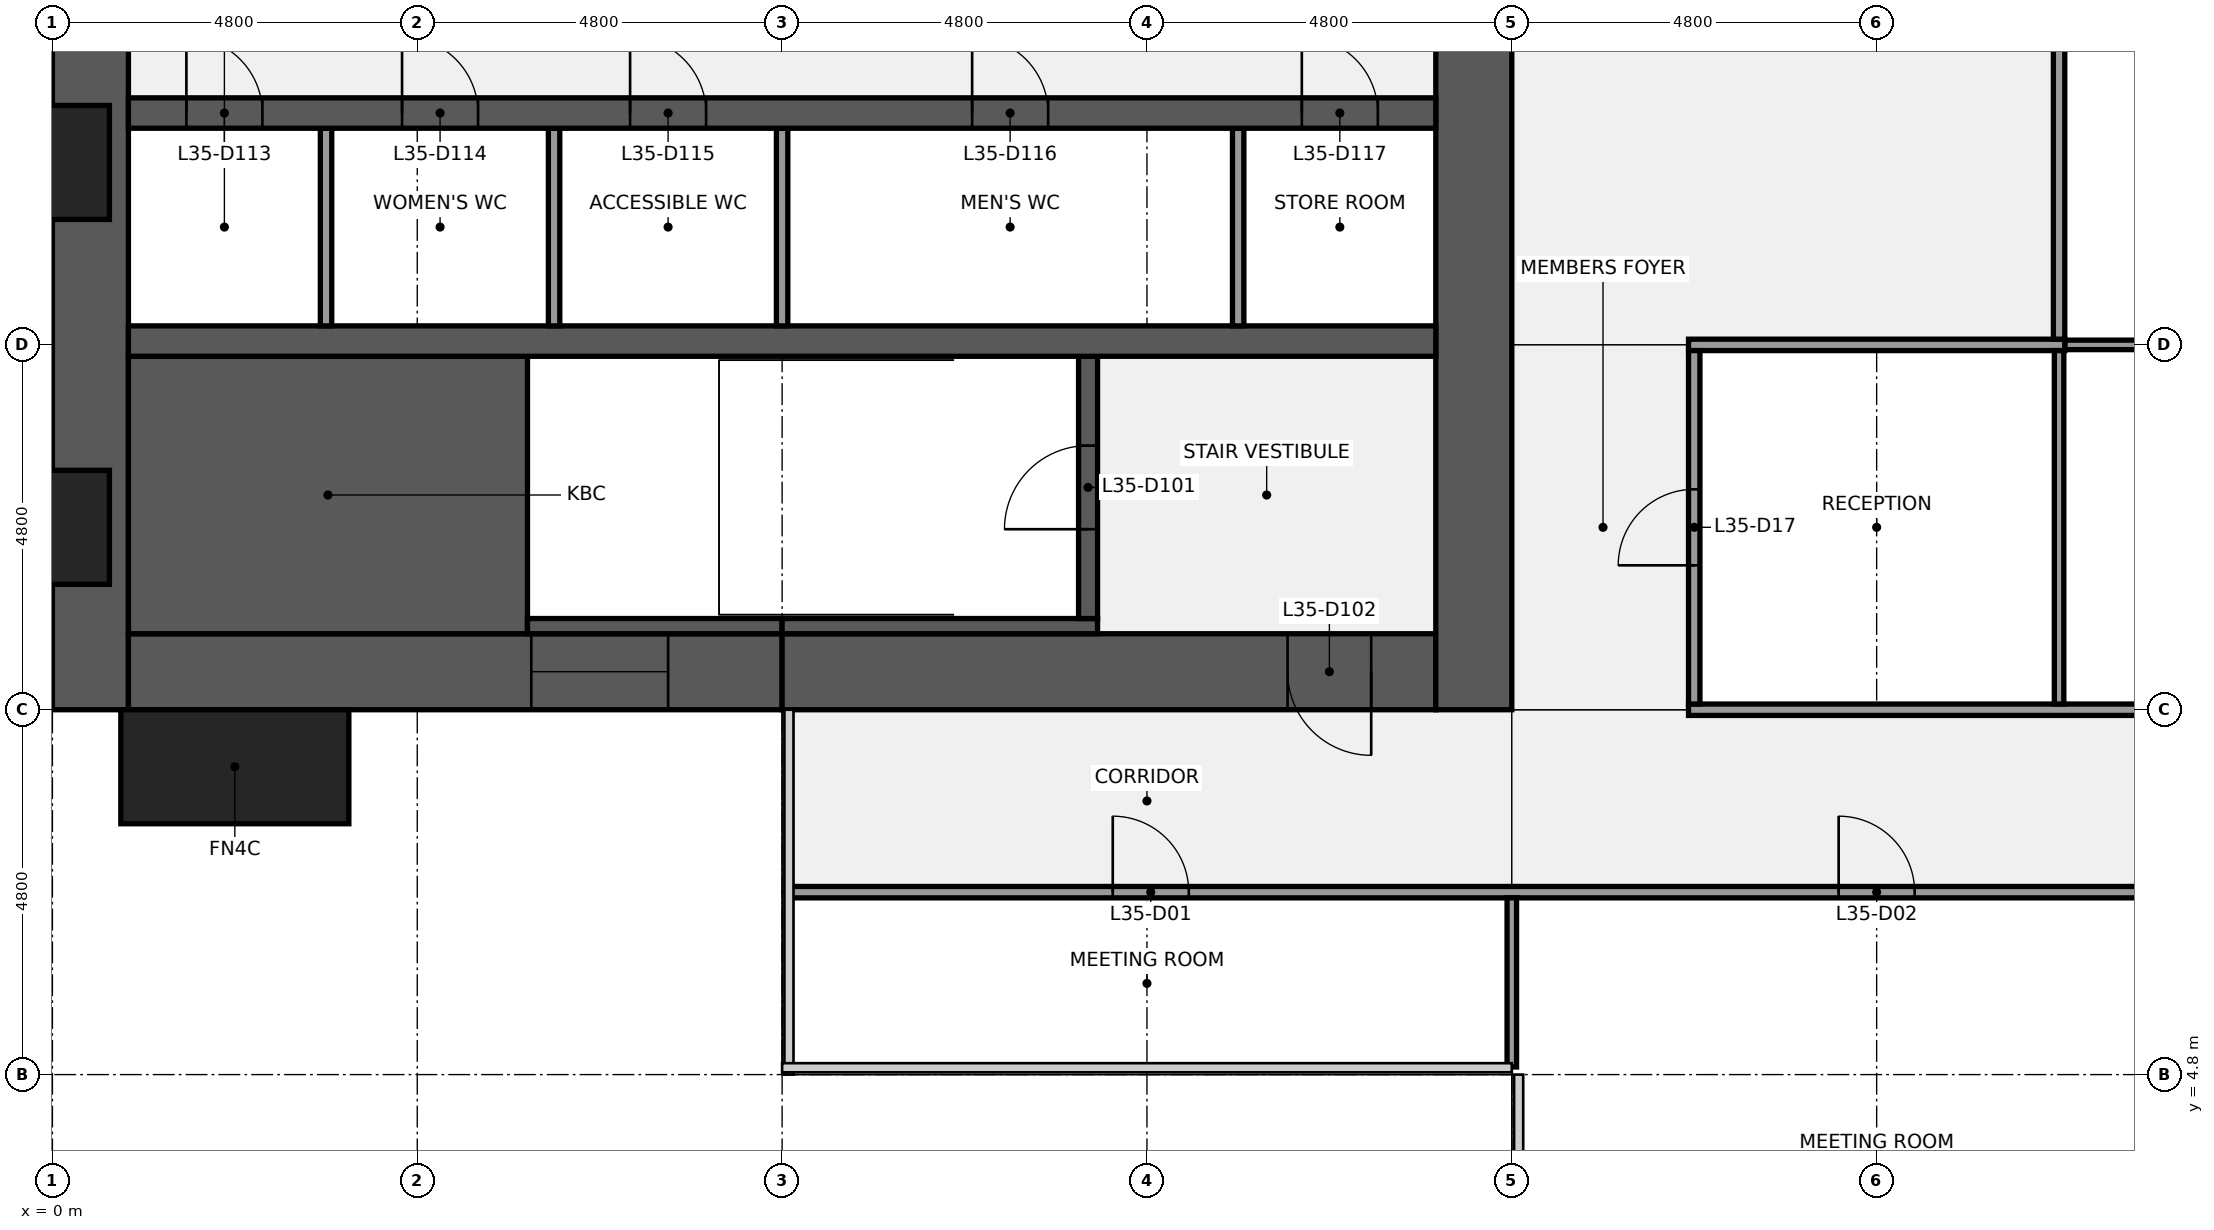
"""IFC4 building model, lengths in metres.
Left out: names, types, materials, properties, quantities, classifications, styles, units other than length and angle.
Written with IfcOpenShell. Run it as: python <this file> out.ifc"""

import sys

from ifc_helpers import new_model, si_unit, direction, frame, frame_2d, origin, origin_2d, place, context, subcontext, project, spatial, rectangle, extrude, element, fill, save


model = new_model("IFC4")
c1 = context("Model", 3, precision=1e-05, world=origin(), true_north=direction((0.0, 1.0)))
c2 = subcontext(c1, "Body", "Model", "MODEL_VIEW")
j1 = project(units=[si_unit("LENGTHUNIT", "METRE"), si_unit("PLANEANGLEUNIT", "RADIAN")], contexts=[c1])
p1 = place(None, origin())
s1 = spatial("IfcSite", under=j1, at=p1, CompositionType="ELEMENT")
p2 = place(p1, origin())
s2 = spatial("IfcBuilding", under=s1, at=p2, CompositionType="ELEMENT")
p3 = place(p2, frame((0.0, 0.0, 160.1)))
s3 = spatial("IfcBuildingStorey", under=s2, at=p3, CompositionType="ELEMENT", Elevation=160.1)
p4 = place(p3, frame((0.5, 9.6, 0.0), z_axis=(0.0, 0.0, 1.0), x_axis=(0.0, 1.0, 0.0)))
e1 = element("IfcWall", 1, at=p4, inside=s3, PredefinedType="SHEAR", context=c2, shape_type="SweptSolid", body=[
    extrude(rectangle(XDim=28.8, YDim=1.0, at=frame_2d((14.4, 0.0))), origin(), (0.0, 0.0, 1.0), 3.84),
])
p5 = place(p4, frame((8.85, 0.0, 0.9)))
e2 = element("IfcOpeningElement", 2, at=p5, cuts=e1, PredefinedType="OPENING", context=c2, shape_type="SweptSolid", body=[
    extrude(rectangle(XDim=1.5, YDim=1.5, at=frame_2d((0.75, 0.75))), frame((0.0, 0.51, 0.0), z_axis=(0.0, -1.0, 0.0), x_axis=(1.0, 0.0, 0.0)), (0.0, 0.0, 1.0), 1.02),
])
p6 = place(p4, frame((18.45, 0.0, 0.9)))
e3 = element("IfcOpeningElement", 3, at=p6, cuts=e1, PredefinedType="OPENING", context=c2, shape_type="SweptSolid", body=[
    extrude(rectangle(XDim=1.5, YDim=1.5, at=frame_2d((0.75, 0.75))), frame((0.0, 0.51, 0.0), z_axis=(0.0, -1.0, 0.0), x_axis=(1.0, 0.0, 0.0)), (0.0, 0.0, 1.0), 1.02),
])
p7 = place(p3, frame((9.6, 10.1, 0.0), z_axis=(0.0, 0.0, 1.0), x_axis=(-1.0, 0.0, 0.0)))
e4 = element("IfcWall", 4, at=p7, inside=s3, PredefinedType="SHEAR", context=c2, shape_type="SweptSolid", body=[
    extrude(rectangle(XDim=8.6, YDim=1.0, at=frame_2d((4.3, 0.0))), origin(), (0.0, 0.0, 1.0), 3.84),
])
p8 = place(p7, frame((1.5, 0.0, 0.9)))
e5 = element("IfcOpeningElement", 5, at=p8, cuts=e4, PredefinedType="OPENING", context=c2, shape_type="SweptSolid", body=[
    extrude(rectangle(XDim=1.8, YDim=1.5, at=frame_2d((0.9, 0.75))), frame((0.0, 0.51, 0.0), z_axis=(0.0, -1.0, 0.0), x_axis=(1.0, 0.0, 0.0)), (0.0, 0.0, 1.0), 1.02),
])
p9 = place(p3, frame((18.2, 10.1, 0.0), z_axis=(0.0, 0.0, 1.0), x_axis=(-1.0, 0.0, 0.0)))
e6 = element("IfcWall", 6, at=p9, inside=s3, PredefinedType="SHEAR", context=c2, shape_type="SweptSolid", body=[
    extrude(rectangle(XDim=8.6, YDim=1.0, at=frame_2d((4.3, 0.0))), origin(), (0.0, 0.0, 1.0), 3.84),
])
p10 = place(p9, frame((0.85, 0.0, 0.0)))
e7 = element("IfcOpeningElement", 7, at=p10, cuts=e6, PredefinedType="OPENING", context=c2, shape_type="SweptSolid", body=[
    extrude(rectangle(XDim=1.1, YDim=2.1, at=frame_2d((0.55, 1.05))), frame((0.0, 0.51, 0.0), z_axis=(0.0, -1.0, 0.0), x_axis=(1.0, 0.0, 0.0)), (0.0, 0.0, 1.0), 1.02),
])
p11 = place(p3, frame((18.7, 38.4, 0.0), z_axis=(0.0, 0.0, 1.0), x_axis=(0.0, -1.0, 0.0)))
e8 = element("IfcWall", 8, at=p11, inside=s3, PredefinedType="SHEAR", context=c2, shape_type="SweptSolid", body=[
    extrude(rectangle(XDim=28.8, YDim=1.0, at=frame_2d((14.4, 0.0))), origin(), (0.0, 0.0, 1.0), 3.84),
])
p12 = place(p11, frame((18.3, 0.0, 0.0)))
e9 = element("IfcOpeningElement", 9, at=p12, cuts=e8, PredefinedType="OPENING", context=c2, shape_type="SweptSolid", body=[
    extrude(rectangle(XDim=1.8, YDim=2.1, at=frame_2d((0.9, 1.05))), frame((0.0, 0.51, 0.0), z_axis=(0.0, -1.0, 0.0), x_axis=(1.0, 0.0, 0.0)), (0.0, 0.0, 1.0), 1.02),
])
p13 = place(p11, frame((8.7, 0.0, 0.0)))
e10 = element("IfcOpeningElement", 10, at=p13, cuts=e8, PredefinedType="OPENING", context=c2, shape_type="SweptSolid", body=[
    extrude(rectangle(XDim=1.8, YDim=2.1, at=frame_2d((0.9, 1.05))), frame((0.0, 0.51, 0.0), z_axis=(0.0, -1.0, 0.0), x_axis=(1.0, 0.0, 0.0)), (0.0, 0.0, 1.0), 1.02),
])
p14 = place(p3, frame((1.0, 12.425, 0.0), z_axis=(0.0, 0.0, 1.0), x_axis=(1.0, 0.0, 0.0)))
e11 = element("IfcWall", 11, at=p14, inside=s3, PredefinedType="SHEAR", context=c2, shape_type="SweptSolid", body=[
    extrude(rectangle(XDim=5.25, YDim=3.65, at=frame_2d((2.625, 0.0))), origin(), (0.0, 0.0, 1.0), 3.84),
])
p15 = place(p3, frame((6.25, 10.7, 0.0), z_axis=(0.0, 0.0, 1.0), x_axis=(1.0, 0.0, 0.0)))
e12 = element("IfcWall", 12, at=p15, inside=s3, PredefinedType="SHEAR", context=c2, shape_type="SweptSolid", body=[
    extrude(rectangle(XDim=3.35, YDim=0.2, at=frame_2d((1.675, 0.0))), origin(), (0.0, 0.0, 1.0), 3.84),
])
p16 = place(p3, frame((9.6, 10.7, 0.0), z_axis=(0.0, 0.0, 1.0), x_axis=(1.0, 0.0, 0.0)))
e13 = element("IfcWall", 13, at=p16, inside=s3, PredefinedType="SHEAR", context=c2, shape_type="SweptSolid", body=[
    extrude(rectangle(XDim=4.15, YDim=0.2, at=frame_2d((2.075, 0.0))), origin(), (0.0, 0.0, 1.0), 3.84),
])
p17 = place(p3, frame((13.625, 10.8, 0.0), z_axis=(0.0, 0.0, 1.0), x_axis=(0.0, 1.0, 0.0)))
e14 = element("IfcWall", 14, at=p17, inside=s3, PredefinedType="SHEAR", context=c2, shape_type="SweptSolid", body=[
    extrude(rectangle(XDim=3.45, YDim=0.25, at=frame_2d((1.725, 0.0))), origin(), (0.0, 0.0, 1.0), 3.84),
])
p18 = place(p17, frame((1.175, 0.0, 0.0)))
e15 = element("IfcOpeningElement", 15, at=p18, cuts=e14, PredefinedType="OPENING", context=c2, shape_type="SweptSolid", body=[
    extrude(rectangle(XDim=1.1, YDim=2.1, at=frame_2d((0.55, 1.05))), frame((0.0, 0.135, 0.0), z_axis=(0.0, -1.0, 0.0), x_axis=(1.0, 0.0, 0.0)), (0.0, 0.0, 1.0), 0.27),
])
p19 = place(p3, frame((1.0, 14.45, 0.0), z_axis=(0.0, 0.0, 1.0), x_axis=(1.0, 0.0, 0.0)))
e16 = element("IfcWall", 16, at=p19, inside=s3, PredefinedType="SHEAR", context=c2, shape_type="SweptSolid", body=[
    extrude(rectangle(XDim=17.2, YDim=0.4, at=frame_2d((8.6, 0.0))), origin(), (0.0, 0.0, 1.0), 3.84),
])
for number, where, z_axis, x_axis in (
    (17, (3.6, 14.65, 0.0), (0.0, 0.0, 1.0), (0.0, 1.0, 0.0)),
    (18, (6.6, 14.65, 0.0), (0.0, 0.0, 1.0), (0.0, 1.0, 0.0)),
    (19, (9.6, 14.65, 0.0), (0.0, 0.0, 1.0), (0.0, 1.0, 0.0)),
    (20, (15.6, 14.65, 0.0), (0.0, 0.0, 1.0), (0.0, 1.0, 0.0)),
):
    element("IfcWall", number, at=place(p3, frame(where, z_axis=z_axis, x_axis=x_axis)), inside=s3, PredefinedType="PARTITIONING", context=c2, shape_type="SweptSolid", body=[
        extrude(rectangle(XDim=2.6, YDim=0.15, at=frame_2d((1.3, 0.0))), origin(), (0.0, 0.0, 1.0), 3.84),
    ])
p20 = place(p3, frame((1.0, 17.45, 0.0), z_axis=(0.0, 0.0, 1.0), x_axis=(1.0, 0.0, 0.0)))
e21 = element("IfcWall", 21, at=p20, inside=s3, PredefinedType="SHEAR", context=c2, shape_type="SweptSolid", body=[
    extrude(rectangle(XDim=17.2, YDim=0.4, at=frame_2d((8.6, 0.0))), origin(), (0.0, 0.0, 1.0), 3.84),
])
p21 = place(p20, frame((0.762, 0.0, 0.0)))
e22 = element("IfcOpeningElement", 22, at=p21, cuts=e21, PredefinedType="OPENING", context=c2, shape_type="SweptSolid", body=[
    extrude(rectangle(XDim=1.0, YDim=2.1, at=frame_2d((0.5, 1.05))), frame((0.0, 0.21, 0.0), z_axis=(0.0, -1.0, 0.0), x_axis=(1.0, 0.0, 0.0)), (0.0, 0.0, 1.0), 0.42),
])
p22 = place(p20, frame((3.6, 0.0, 0.0)))
e23 = element("IfcOpeningElement", 23, at=p22, cuts=e21, PredefinedType="OPENING", context=c2, shape_type="SweptSolid", body=[
    extrude(rectangle(XDim=1.0, YDim=2.1, at=frame_2d((0.5, 1.05))), frame((0.0, 0.21, 0.0), z_axis=(0.0, -1.0, 0.0), x_axis=(1.0, 0.0, 0.0)), (0.0, 0.0, 1.0), 0.42),
])
p23 = place(p20, frame((6.6, 0.0, 0.0)))
e24 = element("IfcOpeningElement", 24, at=p23, cuts=e21, PredefinedType="OPENING", context=c2, shape_type="SweptSolid", body=[
    extrude(rectangle(XDim=1.0, YDim=2.1, at=frame_2d((0.5, 1.05))), frame((0.0, 0.21, 0.0), z_axis=(0.0, -1.0, 0.0), x_axis=(1.0, 0.0, 0.0)), (0.0, 0.0, 1.0), 0.42),
])
p24 = place(p20, frame((11.1, 0.0, 0.0)))
e25 = element("IfcOpeningElement", 25, at=p24, cuts=e21, PredefinedType="OPENING", context=c2, shape_type="SweptSolid", body=[
    extrude(rectangle(XDim=1.0, YDim=2.1, at=frame_2d((0.5, 1.05))), frame((0.0, 0.21, 0.0), z_axis=(0.0, -1.0, 0.0), x_axis=(1.0, 0.0, 0.0)), (0.0, 0.0, 1.0), 0.42),
])
p25 = place(p20, frame((15.438, 0.0, 0.0)))
e26 = element("IfcOpeningElement", 26, at=p25, cuts=e21, PredefinedType="OPENING", context=c2, shape_type="SweptSolid", body=[
    extrude(rectangle(XDim=1.0, YDim=2.1, at=frame_2d((0.5, 1.05))), frame((0.0, 0.21, 0.0), z_axis=(0.0, -1.0, 0.0), x_axis=(1.0, 0.0, 0.0)), (0.0, 0.0, 1.0), 0.42),
])
p26 = place(p3, frame((9.7, 7.2, 0.0), z_axis=(0.0, 0.0, 1.0), x_axis=(1.0, 0.0, 0.0)))
e27 = element("IfcWall", 27, at=p26, inside=s3, PredefinedType="PARTITIONING", context=c2, shape_type="SweptSolid", body=[
    extrude(rectangle(XDim=38.2, YDim=0.15, at=frame_2d((19.1, 0.0))), origin(), (0.0, 0.0, 1.0), 2.849),
])
p27 = place(p26, frame((4.25, 0.0, 0.0)))
e28 = element("IfcOpeningElement", 28, at=p27, cuts=e27, PredefinedType="OPENING", context=c2, shape_type="SweptSolid", body=[
    extrude(rectangle(XDim=1.0, YDim=2.1, at=frame_2d((0.5, 1.05))), frame((0.0, 0.085, 0.0), z_axis=(0.0, -1.0, 0.0), x_axis=(1.0, 0.0, 0.0)), (0.0, 0.0, 1.0), 0.17),
])
p28 = place(p26, frame((13.8, 0.0, 0.0)))
e29 = element("IfcOpeningElement", 29, at=p28, cuts=e27, PredefinedType="OPENING", context=c2, shape_type="SweptSolid", body=[
    extrude(rectangle(XDim=1.0, YDim=2.1, at=frame_2d((0.5, 1.05))), frame((0.0, 0.085, 0.0), z_axis=(0.0, -1.0, 0.0), x_axis=(1.0, 0.0, 0.0)), (0.0, 0.0, 1.0), 0.17),
])
p29 = place(p26, frame((23.4, 0.0, 0.0)))
e30 = element("IfcOpeningElement", 30, at=p29, cuts=e27, PredefinedType="OPENING", context=c2, shape_type="SweptSolid", body=[
    extrude(rectangle(XDim=1.0, YDim=2.1, at=frame_2d((0.5, 1.05))), frame((0.0, 0.085, 0.0), z_axis=(0.0, -1.0, 0.0), x_axis=(1.0, 0.0, 0.0)), (0.0, 0.0, 1.0), 0.17),
])
p30 = place(p26, frame((32.95, 0.0, 0.0)))
e31 = element("IfcOpeningElement", 31, at=p30, cuts=e27, PredefinedType="OPENING", context=c2, shape_type="SweptSolid", body=[
    extrude(rectangle(XDim=1.0, YDim=2.1, at=frame_2d((0.5, 1.05))), frame((0.0, 0.085, 0.0), z_axis=(0.0, -1.0, 0.0), x_axis=(1.0, 0.0, 0.0)), (0.0, 0.0, 1.0), 0.17),
])
p31 = place(p3, frame((21.525, 9.6, 0.0), z_axis=(0.0, 0.0, 1.0), x_axis=(1.0, 0.0, 0.0)))
e32 = element("IfcWall", 32, at=p31, inside=s3, PredefinedType="PARTITIONING", context=c2, shape_type="SweptSolid", body=[
    extrude(rectangle(XDim=14.55, YDim=0.15, at=frame_2d((7.275, 0.0))), origin(), (0.0, 0.0, 1.0), 2.849),
])
p32 = place(p31, frame((9.175, 0.0, 0.0)))
e33 = element("IfcOpeningElement", 33, at=p32, cuts=e32, PredefinedType="OPENING", context=c2, shape_type="SweptSolid", body=[
    extrude(rectangle(XDim=1.0, YDim=2.1, at=frame_2d((0.5, 1.05))), frame((0.0, 0.085, 0.0), z_axis=(0.0, -1.0, 0.0), x_axis=(1.0, 0.0, 0.0)), (0.0, 0.0, 1.0), 0.17),
])
p33 = place(p3, frame((26.475, 14.4, 0.0), z_axis=(0.0, 0.0, 1.0), x_axis=(1.0, 0.0, 0.0)))
e34 = element("IfcWall", 34, at=p33, inside=s3, PredefinedType="PARTITIONING", context=c2, shape_type="SweptSolid", body=[
    extrude(rectangle(XDim=4.8, YDim=0.125, at=frame_2d((2.4, 0.0))), origin(), (0.0, 0.0, 1.0), 2.849),
])
p34 = place(p3, frame((21.525, 14.4, 0.0), z_axis=(0.0, 0.0, 1.0), x_axis=(1.0, 0.0, 0.0)))
e35 = element("IfcWall", 35, at=p34, inside=s3, PredefinedType="PARTITIONING", context=c2, shape_type="SweptSolid", body=[
    extrude(rectangle(XDim=4.95, YDim=0.15, at=frame_2d((2.475, 0.0))), origin(), (0.0, 0.0, 1.0), 2.849),
])
p35 = place(p3, frame((19.2, 4.9, 0.0), z_axis=(0.0, 0.0, 1.0), x_axis=(0.0, 1.0, 0.0)))
e36 = element("IfcWall", 36, at=p35, inside=s3, PredefinedType="PARTITIONING", context=c2, shape_type="SweptSolid", body=[
    extrude(rectangle(XDim=2.225, YDim=0.125, at=frame_2d((1.113, 0.0))), origin(), (0.0, 0.0, 1.0), 2.849),
])
p36 = place(p3, frame((21.6, 9.675, 0.0), z_axis=(0.0, 0.0, 1.0), x_axis=(0.0, 1.0, 0.0)))
e37 = element("IfcWall", 37, at=p36, inside=s3, PredefinedType="PARTITIONING", context=c2, shape_type="SweptSolid", body=[
    extrude(rectangle(XDim=4.65, YDim=0.15, at=frame_2d((2.325, 0.0))), origin(), (0.0, 0.0, 1.0), 2.849),
])
p37 = place(p36, frame((1.825, 0.0, 0.0)))
e38 = element("IfcOpeningElement", 38, at=p37, cuts=e37, PredefinedType="OPENING", context=c2, shape_type="SweptSolid", body=[
    extrude(rectangle(XDim=1.0, YDim=2.1, at=frame_2d((0.5, 1.05))), frame((0.0, 0.085, 0.0), z_axis=(0.0, -1.0, 0.0), x_axis=(1.0, 0.0, 0.0)), (0.0, 0.0, 1.0), 0.17),
])
p38 = place(p3, frame((26.4, 9.675, 0.0), z_axis=(0.0, 0.0, 1.0), x_axis=(0.0, 1.0, 0.0)))
e39 = element("IfcWall", 39, at=p38, inside=s3, PredefinedType="PARTITIONING", context=c2, shape_type="SweptSolid", body=[
    extrude(rectangle(XDim=4.65, YDim=0.125, at=frame_2d((2.325, 0.0))), origin(), (0.0, 0.0, 1.0), 2.849),
])
p39 = place(p3, frame((26.4, 14.475, 0.0), z_axis=(0.0, 0.0, 1.0), x_axis=(0.0, 1.0, 0.0)))
e40 = element("IfcWall", 40, at=p39, inside=s3, PredefinedType="PARTITIONING", context=c2, shape_type="SweptSolid", body=[
    extrude(rectangle(XDim=13.05, YDim=0.15, at=frame_2d((6.525, 0.0))), origin(), (0.0, 0.0, 1.0), 2.849),
])
p40 = place(p39, frame((6.025, 0.0, 0.0)))
e41 = element("IfcOpeningElement", 41, at=p40, cuts=e40, PredefinedType="OPENING", context=c2, shape_type="SweptSolid", body=[
    extrude(rectangle(XDim=1.0, YDim=2.1, at=frame_2d((0.5, 1.05))), frame((0.0, 0.085, 0.0), z_axis=(0.0, -1.0, 0.0), x_axis=(1.0, 0.0, 0.0)), (0.0, 0.0, 1.0), 0.17),
])
p41 = place(p3, frame((2.4, 8.85, 0.0), z_axis=(0.0, 0.0, 1.0), x_axis=(1.0, 0.0, 0.0)))
e42 = element("IfcColumn", 42, at=p41, inside=s3, PredefinedType="PILASTER", context=c2, shape_type="SweptSolid", body=[
    extrude(rectangle(XDim=3.0, YDim=1.5, at=origin_2d()), origin(), (0.0, 0.0, 1.0), 4.0),
])
p42 = place(p18, origin())
e43 = element("IfcDoor", 43, at=p42, inside=s3, OperationType="SINGLE_SWING_LEFT", PredefinedType="DOOR", context=c2, shape_type="SweptSolid", body=[
    extrude(rectangle(XDim=1.1, YDim=2.1, at=frame_2d((0.55, 1.05))), frame((0.0, 0.025, 0.0), z_axis=(0.0, -1.0, 0.0), x_axis=(1.0, 0.0, 0.0)), (0.0, 0.0, 1.0), 0.05),
])
fill(e15, e43)
p43 = place(p10, origin())
e44 = element("IfcDoor", 44, at=p43, inside=s3, OperationType="SINGLE_SWING_LEFT", PredefinedType="DOOR", context=c2, shape_type="SweptSolid", body=[
    extrude(rectangle(XDim=1.1, YDim=2.1, at=frame_2d((0.55, 1.05))), frame((0.0, 0.025, 0.0), z_axis=(0.0, -1.0, 0.0), x_axis=(1.0, 0.0, 0.0)), (0.0, 0.0, 1.0), 0.05),
])
fill(e7, e44)
p44 = place(p21, origin())
e45 = element("IfcDoor", 45, at=p44, inside=s3, OperationType="SINGLE_SWING_LEFT", PredefinedType="DOOR", context=c2, shape_type="SweptSolid", body=[
    extrude(rectangle(XDim=1.0, YDim=2.1, at=frame_2d((0.5, 1.05))), frame((0.0, 0.025, 0.0), z_axis=(0.0, -1.0, 0.0), x_axis=(1.0, 0.0, 0.0)), (0.0, 0.0, 1.0), 0.05),
])
fill(e22, e45)
p45 = place(p22, origin())
e46 = element("IfcDoor", 46, at=p45, inside=s3, OperationType="SINGLE_SWING_LEFT", PredefinedType="DOOR", context=c2, shape_type="SweptSolid", body=[
    extrude(rectangle(XDim=1.0, YDim=2.1, at=frame_2d((0.5, 1.05))), frame((0.0, 0.025, 0.0), z_axis=(0.0, -1.0, 0.0), x_axis=(1.0, 0.0, 0.0)), (0.0, 0.0, 1.0), 0.05),
])
fill(e23, e46)
p46 = place(p23, origin())
e47 = element("IfcDoor", 47, at=p46, inside=s3, OperationType="SINGLE_SWING_LEFT", PredefinedType="DOOR", context=c2, shape_type="SweptSolid", body=[
    extrude(rectangle(XDim=1.0, YDim=2.1, at=frame_2d((0.5, 1.05))), frame((0.0, 0.025, 0.0), z_axis=(0.0, -1.0, 0.0), x_axis=(1.0, 0.0, 0.0)), (0.0, 0.0, 1.0), 0.05),
])
fill(e24, e47)
p47 = place(p24, origin())
e48 = element("IfcDoor", 48, at=p47, inside=s3, OperationType="SINGLE_SWING_LEFT", PredefinedType="DOOR", context=c2, shape_type="SweptSolid", body=[
    extrude(rectangle(XDim=1.0, YDim=2.1, at=frame_2d((0.5, 1.05))), frame((0.0, 0.025, 0.0), z_axis=(0.0, -1.0, 0.0), x_axis=(1.0, 0.0, 0.0)), (0.0, 0.0, 1.0), 0.05),
])
fill(e25, e48)
p48 = place(p25, origin())
e49 = element("IfcDoor", 49, at=p48, inside=s3, OperationType="SINGLE_SWING_LEFT", PredefinedType="DOOR", context=c2, shape_type="SweptSolid", body=[
    extrude(rectangle(XDim=1.0, YDim=2.1, at=frame_2d((0.5, 1.05))), frame((0.0, 0.025, 0.0), z_axis=(0.0, -1.0, 0.0), x_axis=(1.0, 0.0, 0.0)), (0.0, 0.0, 1.0), 0.05),
])
fill(e26, e49)
p49 = place(p8, origin())
e50 = element("IfcWindow", 50, at=p49, inside=s3, PartitioningType="SINGLE_PANEL", PredefinedType="WINDOW", context=c2, shape_type="SweptSolid", body=[
    extrude(rectangle(XDim=1.8, YDim=1.5, at=frame_2d((0.9, 0.75))), frame((0.0, 0.03, 0.0), z_axis=(0.0, -1.0, 0.0), x_axis=(1.0, 0.0, 0.0)), (0.0, 0.0, 1.0), 0.06),
])
fill(e5, e50)
p50 = place(p27, origin())
e51 = element("IfcDoor", 51, at=p50, inside=s3, OperationType="SINGLE_SWING_LEFT", PredefinedType="DOOR", context=c2, shape_type="SweptSolid", body=[
    extrude(rectangle(XDim=1.0, YDim=2.1, at=frame_2d((0.5, 1.05))), frame((0.0, 0.025, 0.0), z_axis=(0.0, -1.0, 0.0), x_axis=(1.0, 0.0, 0.0)), (0.0, 0.0, 1.0), 0.05),
])
fill(e28, e51)
p51 = place(p28, origin())
e52 = element("IfcDoor", 52, at=p51, inside=s3, OperationType="SINGLE_SWING_LEFT", PredefinedType="DOOR", context=c2, shape_type="SweptSolid", body=[
    extrude(rectangle(XDim=1.0, YDim=2.1, at=frame_2d((0.5, 1.05))), frame((0.0, 0.025, 0.0), z_axis=(0.0, -1.0, 0.0), x_axis=(1.0, 0.0, 0.0)), (0.0, 0.0, 1.0), 0.05),
])
fill(e29, e52)
p52 = place(p37, origin())
e53 = element("IfcDoor", 53, at=p52, inside=s3, OperationType="SINGLE_SWING_LEFT", PredefinedType="DOOR", context=c2, shape_type="SweptSolid", body=[
    extrude(rectangle(XDim=1.0, YDim=2.1, at=frame_2d((0.5, 1.05))), frame((0.0, 0.025, 0.0), z_axis=(0.0, -1.0, 0.0), x_axis=(1.0, 0.0, 0.0)), (0.0, 0.0, 1.0), 0.05),
])
fill(e38, e53)
save(model, sys.argv[1])
